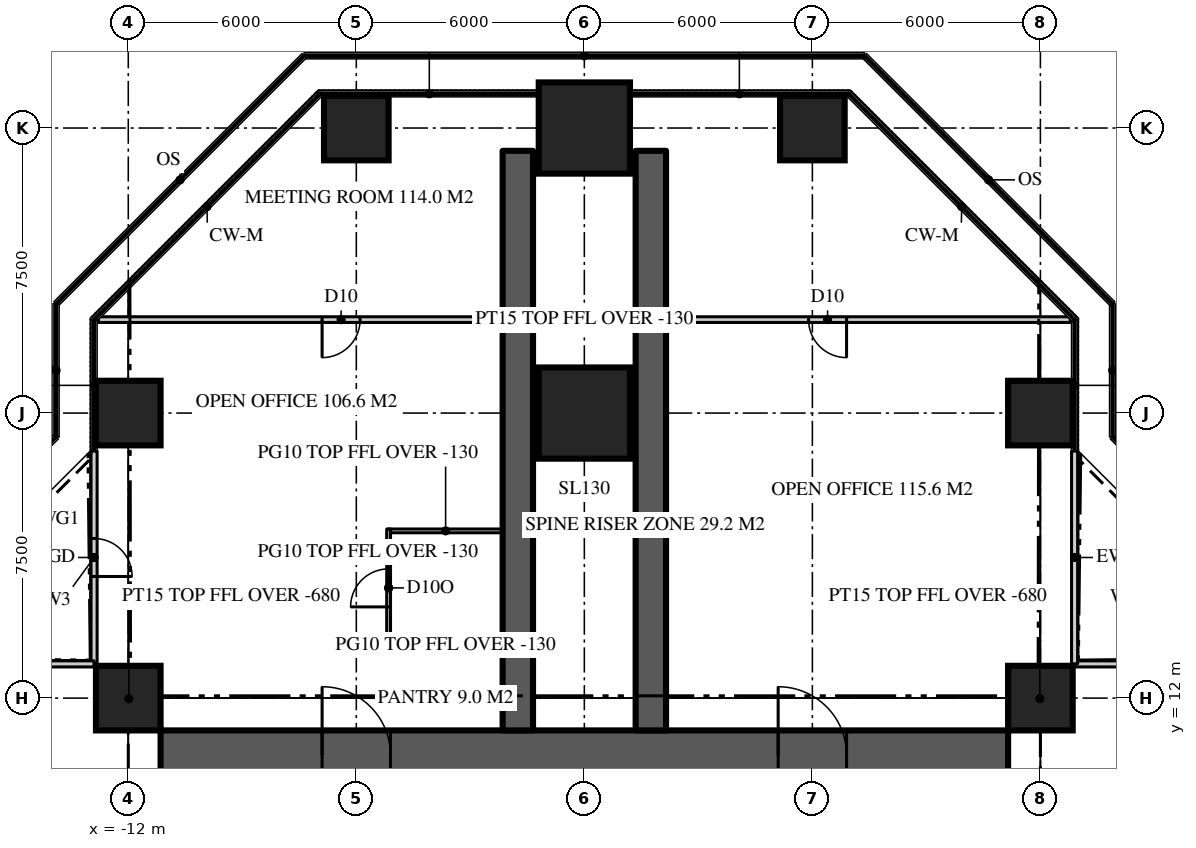
"""IFC4 building model, lengths in metres.
Left out: names, types, materials, properties, quantities, classifications, styles, units other than length and angle.
Written with IfcOpenShell. Run it as: python <this file> out.ifc"""

import sys

from ifc_helpers import new_model, si_unit, direction, frame, frame_2d, origin, origin_2d, place, context, subcontext, project, spatial, rectangle, extrude, element, fill, save


model = new_model("IFC4")
c1 = context("Model", 3, precision=1e-05, world=origin(), true_north=direction((0.0, 1.0)))
c2 = subcontext(c1, "Body", "Model", "MODEL_VIEW")
j1 = project(units=[si_unit("LENGTHUNIT", "METRE"), si_unit("PLANEANGLEUNIT", "RADIAN")], contexts=[c1])
p1 = place(None, origin())
s1 = spatial("IfcSite", under=j1, at=p1, CompositionType="ELEMENT")
p2 = place(p1, origin())
s2 = spatial("IfcBuilding", under=s1, at=p2, CompositionType="ELEMENT")
p3 = place(p2, frame((0.0, 0.0, 163.2)))
s3 = spatial("IfcBuildingStorey", under=s2, at=p3, CompositionType="ELEMENT", Elevation=163.2)
p4 = place(p3, frame((-11.15, 10.5, 0.0), z_axis=(0.0, 0.0, 1.0), x_axis=(1.0, 0.0, 0.0)))
e1 = element("IfcWall", 1, at=p4, inside=s3, PredefinedType="SHEAR", context=c2, shape_type="SweptSolid", body=[
    extrude(rectangle(XDim=22.3, YDim=1.3, at=frame_2d((11.15, 0.0))), origin(), (0.0, 0.0, 1.0), 3.9),
])
p5 = place(p4, frame((4.25, 0.0, 0.0)))
e2 = element("IfcOpeningElement", 2, at=p5, cuts=e1, PredefinedType="OPENING", context=c2, shape_type="SweptSolid", body=[
    extrude(rectangle(XDim=1.8, YDim=2.2, at=frame_2d((0.9, 1.1))), frame((0.0, 0.66, 0.0), z_axis=(0.0, -1.0, 0.0), x_axis=(1.0, 0.0, 0.0)), (0.0, 0.0, 1.0), 1.32),
])
p6 = place(p4, frame((16.25, 0.0, 0.0)))
e3 = element("IfcOpeningElement", 3, at=p6, cuts=e1, PredefinedType="OPENING", context=c2, shape_type="SweptSolid", body=[
    extrude(rectangle(XDim=1.8, YDim=2.2, at=frame_2d((0.9, 1.1))), frame((0.0, 0.66, 0.0), z_axis=(0.0, -1.0, 0.0), x_axis=(1.0, 0.0, 0.0)), (0.0, 0.0, 1.0), 1.32),
])
for number, where, z_axis, x_axis in (
    (4, (1.75, 11.15, 0.0), (0.0, 0.0, 1.0), (0.0, 1.0, 0.0)),
    (5, (-1.75, 11.15, 0.0), (0.0, 0.0, 1.0), (0.0, 1.0, 0.0)),
):
    element("IfcWall", number, at=place(p3, frame(where, z_axis=z_axis, x_axis=x_axis)), inside=s3, PredefinedType="SHEAR", context=c2, shape_type="SweptSolid", body=[
        extrude(rectangle(XDim=15.25, YDim=0.8, at=frame_2d((7.625, 0.0))), origin(), (0.0, 0.0, 1.0), 3.9),
    ])
for number, where, z_axis, x_axis in (
    (6, (-12.0, 12.0, 0.0), (0.0, 0.0, 1.0), (1.0, 0.0, 0.0)),
    (7, (12.0, 12.0, 0.0), (0.0, 0.0, 1.0), (1.0, 0.0, 0.0)),
    (8, (-12.0, 19.5, 0.0), (0.0, 0.0, 1.0), (1.0, 0.0, 0.0)),
):
    element("IfcColumn", number, at=place(p3, frame(where, z_axis=z_axis, x_axis=x_axis)), inside=s3, PredefinedType="COLUMN", context=c2, shape_type="SweptSolid", body=[
        extrude(rectangle(XDim=1.7, YDim=1.7, at=origin_2d()), origin(), (0.0, 0.0, 1.0), 3.9),
    ])
p7 = place(p3, frame((0.0, 19.5, 0.0), z_axis=(0.0, 0.0, 1.0), x_axis=(1.0, 0.0, 0.0)))
e9 = element("IfcColumn", 9, at=p7, inside=s3, PredefinedType="COLUMN", context=c2, shape_type="SweptSolid", body=[
    extrude(rectangle(XDim=2.4, YDim=2.4, at=origin_2d()), origin(), (0.0, 0.0, 1.0), 3.9),
])
for number, where, z_axis, x_axis in (
    (10, (12.0, 19.5, 0.0), (0.0, 0.0, 1.0), (1.0, 0.0, 0.0)),
    (11, (-6.0, 27.0, 0.0), (0.0, 0.0, 1.0), (1.0, 0.0, 0.0)),
):
    element("IfcColumn", number, at=place(p3, frame(where, z_axis=z_axis, x_axis=x_axis)), inside=s3, PredefinedType="COLUMN", context=c2, shape_type="SweptSolid", body=[
        extrude(rectangle(XDim=1.7, YDim=1.7, at=origin_2d()), origin(), (0.0, 0.0, 1.0), 3.9),
    ])
p8 = place(p3, frame((0.0, 27.0, 0.0), z_axis=(0.0, 0.0, 1.0), x_axis=(1.0, 0.0, 0.0)))
e12 = element("IfcColumn", 12, at=p8, inside=s3, PredefinedType="COLUMN", context=c2, shape_type="SweptSolid", body=[
    extrude(rectangle(XDim=2.4, YDim=2.4, at=origin_2d()), origin(), (0.0, 0.0, 1.0), 3.9),
])
p9 = place(p3, frame((6.0, 27.0, 0.0), z_axis=(0.0, 0.0, 1.0), x_axis=(1.0, 0.0, 0.0)))
e13 = element("IfcColumn", 13, at=p9, inside=s3, PredefinedType="COLUMN", context=c2, shape_type="SweptSolid", body=[
    extrude(rectangle(XDim=1.7, YDim=1.7, at=origin_2d()), origin(), (0.0, 0.0, 1.0), 3.9),
])
p10 = place(p3, frame((18.5, 12.9, 0.0), z_axis=(0.0, 0.0, 1.0), x_axis=(-1.0, 0.0, 0.0)))
e14 = element("IfcWall", 14, at=p10, inside=s3, PredefinedType="SOLIDWALL", context=c2, shape_type="SweptSolid", body=[
    extrude(rectangle(XDim=5.6, YDim=0.16, at=frame_2d((2.8, 0.0))), origin(), (0.0, 0.0, 1.0), 3.77),
])
p11 = place(p10, frame((2.3, 0.0, 0.0)))
e15 = element("IfcOpeningElement", 15, at=p11, cuts=e14, PredefinedType="OPENING", context=c2, shape_type="SweptSolid", body=[
    extrude(rectangle(XDim=1.0, YDim=2.2, at=frame_2d((0.5, 1.1))), frame((0.0, 0.09, 0.0), z_axis=(0.0, -1.0, 0.0), x_axis=(1.0, 0.0, 0.0)), (0.0, 0.0, 1.0), 0.18),
])
p12 = place(p3, frame((12.9, 12.9, 0.0), z_axis=(0.0, 0.0, 1.0), x_axis=(0.0, 1.0, 0.0)))
e16 = element("IfcWall", 16, at=p12, inside=s3, PredefinedType="SOLIDWALL", context=c2, shape_type="SweptSolid", body=[
    extrude(rectangle(XDim=5.6, YDim=0.16, at=frame_2d((2.8, 0.0))), origin(), (0.0, 0.0, 1.0), 3.77),
])
p13 = place(p3, frame((-12.9, 18.5, 0.0), z_axis=(0.0, 0.0, 1.0), x_axis=(0.0, -1.0, 0.0)))
e17 = element("IfcWall", 17, at=p13, inside=s3, PredefinedType="SOLIDWALL", context=c2, shape_type="SweptSolid", body=[
    extrude(rectangle(XDim=5.6, YDim=0.16, at=frame_2d((2.8, 0.0))), origin(), (0.0, 0.0, 1.0), 3.77),
])
p14 = place(p13, frame((2.3, 0.0, 0.0)))
e18 = element("IfcOpeningElement", 18, at=p14, cuts=e17, PredefinedType="OPENING", context=c2, shape_type="SweptSolid", body=[
    extrude(rectangle(XDim=1.0, YDim=2.2, at=frame_2d((0.5, 1.1))), frame((0.0, 0.09, 0.0), z_axis=(0.0, -1.0, 0.0), x_axis=(1.0, 0.0, 0.0)), (0.0, 0.0, 1.0), 0.18),
])
p15 = place(p3, frame((-12.9, 12.9, 0.0), z_axis=(0.0, 0.0, 1.0), x_axis=(-1.0, 0.0, 0.0)))
e19 = element("IfcWall", 19, at=p15, inside=s3, PredefinedType="SOLIDWALL", context=c2, shape_type="SweptSolid", body=[
    extrude(rectangle(XDim=5.6, YDim=0.16, at=frame_2d((2.8, 0.0))), origin(), (0.0, 0.0, 1.0), 3.77),
])
p16 = place(p3, frame((12.786, 21.959, 0.0), z_axis=(0.0, 0.0, 1.0), x_axis=(-1.0, 0.0, 0.0)))
e20 = element("IfcWall", 20, at=p16, inside=s3, PredefinedType="PARTITIONING", context=c2, shape_type="SweptSolid", body=[
    extrude(rectangle(XDim=25.573, YDim=0.15, at=frame_2d((12.786, 0.0))), origin(), (0.0, 0.0, 1.0), 3.77),
])
p17 = place(p16, frame((18.687, 0.0, 0.0)))
e21 = element("IfcOpeningElement", 21, at=p17, cuts=e20, PredefinedType="OPENING", context=c2, shape_type="SweptSolid", body=[
    extrude(rectangle(XDim=1.0, YDim=2.2, at=frame_2d((0.5, 1.1))), frame((0.0, 0.085, 0.0), z_axis=(0.0, -1.0, 0.0), x_axis=(1.0, 0.0, 0.0)), (0.0, 0.0, 1.0), 0.17),
])
p18 = place(p16, frame((5.886, 0.0, 0.0)))
e22 = element("IfcOpeningElement", 22, at=p18, cuts=e20, PredefinedType="OPENING", context=c2, shape_type="SweptSolid", body=[
    extrude(rectangle(XDim=1.0, YDim=2.2, at=frame_2d((0.5, 1.1))), frame((0.0, 0.085, 0.0), z_axis=(0.0, -1.0, 0.0), x_axis=(1.0, 0.0, 0.0)), (0.0, 0.0, 1.0), 0.17),
])
for number, where, z_axis, x_axis in (
    (23, (-2.15, 13.4, 0.0), (0.0, 0.0, 1.0), (-1.0, 0.0, 0.0)),
    (24, (-2.15, 16.4, 0.0), (0.0, 0.0, 1.0), (-1.0, 0.0, 0.0)),
):
    element("IfcWall", number, at=place(p3, frame(where, z_axis=z_axis, x_axis=x_axis)), inside=s3, PredefinedType="PARTITIONING", context=c2, shape_type="SweptSolid", body=[
        extrude(rectangle(XDim=3.0, YDim=0.1, at=frame_2d((1.5, 0.0))), origin(), (0.0, 0.0, 1.0), 3.77),
    ])
p19 = place(p3, frame((-5.15, 13.35, 0.0), z_axis=(0.0, 0.0, 1.0), x_axis=(0.0, 1.0, 0.0)))
e25 = element("IfcWall", 25, at=p19, inside=s3, PredefinedType="PARTITIONING", context=c2, shape_type="SweptSolid", body=[
    extrude(rectangle(XDim=3.1, YDim=0.1, at=frame_2d((1.55, 0.0))), origin(), (0.0, 0.0, 1.0), 3.77),
])
p20 = place(p19, frame((1.05, 0.0, 0.0)))
e26 = element("IfcOpeningElement", 26, at=p20, cuts=e25, PredefinedType="OPENING", context=c2, shape_type="SweptSolid", body=[
    extrude(rectangle(XDim=1.0, YDim=2.2, at=frame_2d((0.5, 1.1))), frame((0.0, 0.06, 0.0), z_axis=(0.0, -1.0, 0.0), x_axis=(1.0, 0.0, 0.0)), (0.0, 0.0, 1.0), 0.12),
])
for number, where, z_axis, x_axis in (
    (27, (11.15, 11.15, 0.0), (0.0, 0.0, 1.0), (0.707, 0.707, 0.0)),
    (28, (-11.15, 11.15, 0.0), (0.0, 0.0, 1.0), (-0.707, 0.707, 0.0)),
):
    element("IfcWall", number, at=place(p3, frame(where, z_axis=z_axis, x_axis=x_axis)), inside=s3, PredefinedType="PARTITIONING", context=c2, shape_type="SweptSolid", body=[
        extrude(rectangle(XDim=2.362, YDim=0.15, at=frame_2d((1.181, 0.0))), origin(), (0.0, 0.0, 1.0), 3.22),
    ])
p21 = place(p14, origin())
e29 = element("IfcDoor", 29, at=p21, inside=s3, OperationType="SINGLE_SWING_RIGHT", PredefinedType="DOOR", context=c2, shape_type="SweptSolid", body=[
    extrude(rectangle(XDim=1.0, YDim=2.2, at=frame_2d((0.5, 1.1))), frame((0.0, 0.025, 0.0), z_axis=(0.0, -1.0, 0.0), x_axis=(1.0, 0.0, 0.0)), (0.0, 0.0, 1.0), 0.05),
])
fill(e18, e29)
p22 = place(p5, origin())
e30 = element("IfcDoor", 30, at=p22, inside=s3, OperationType="DOUBLE_DOOR_DOUBLE_SWING", PredefinedType="DOOR", context=c2, shape_type="SweptSolid", body=[
    extrude(rectangle(XDim=1.8, YDim=2.2, at=frame_2d((0.9, 1.1))), frame((0.0, 0.025, 0.0), z_axis=(0.0, -1.0, 0.0), x_axis=(1.0, 0.0, 0.0)), (0.0, 0.0, 1.0), 0.05),
])
fill(e2, e30)
p23 = place(p6, origin())
e31 = element("IfcDoor", 31, at=p23, inside=s3, OperationType="DOUBLE_DOOR_DOUBLE_SWING", PredefinedType="DOOR", context=c2, shape_type="SweptSolid", body=[
    extrude(rectangle(XDim=1.8, YDim=2.2, at=frame_2d((0.9, 1.1))), frame((0.0, 0.025, 0.0), z_axis=(0.0, -1.0, 0.0), x_axis=(1.0, 0.0, 0.0)), (0.0, 0.0, 1.0), 0.05),
])
fill(e3, e31)
p24 = place(p17, origin())
e32 = element("IfcDoor", 32, at=p24, inside=s3, OperationType="SINGLE_SWING_RIGHT", PredefinedType="DOOR", context=c2, shape_type="SweptSolid", body=[
    extrude(rectangle(XDim=1.0, YDim=2.2, at=frame_2d((0.5, 1.1))), frame((0.0, 0.025, 0.0), z_axis=(0.0, -1.0, 0.0), x_axis=(1.0, 0.0, 0.0)), (0.0, 0.0, 1.0), 0.05),
])
fill(e21, e32)
p25 = place(p18, origin())
e33 = element("IfcDoor", 33, at=p25, inside=s3, OperationType="SINGLE_SWING_LEFT", PredefinedType="DOOR", context=c2, shape_type="SweptSolid", body=[
    extrude(rectangle(XDim=1.0, YDim=2.2, at=frame_2d((0.5, 1.1))), frame((0.0, 0.025, 0.0), z_axis=(0.0, -1.0, 0.0), x_axis=(1.0, 0.0, 0.0)), (0.0, 0.0, 1.0), 0.05),
])
fill(e22, e33)
p26 = place(p20, origin())
e34 = element("IfcDoor", 34, at=p26, inside=s3, OperationType="SINGLE_SWING_LEFT", PredefinedType="DOOR", context=c2, shape_type="SweptSolid", body=[
    extrude(rectangle(XDim=1.0, YDim=2.2, at=frame_2d((0.5, 1.1))), frame((0.0, 0.025, 0.0), z_axis=(0.0, -1.0, 0.0), x_axis=(1.0, 0.0, 0.0)), (0.0, 0.0, 1.0), 0.05),
])
fill(e26, e34)
save(model, sys.argv[1])
